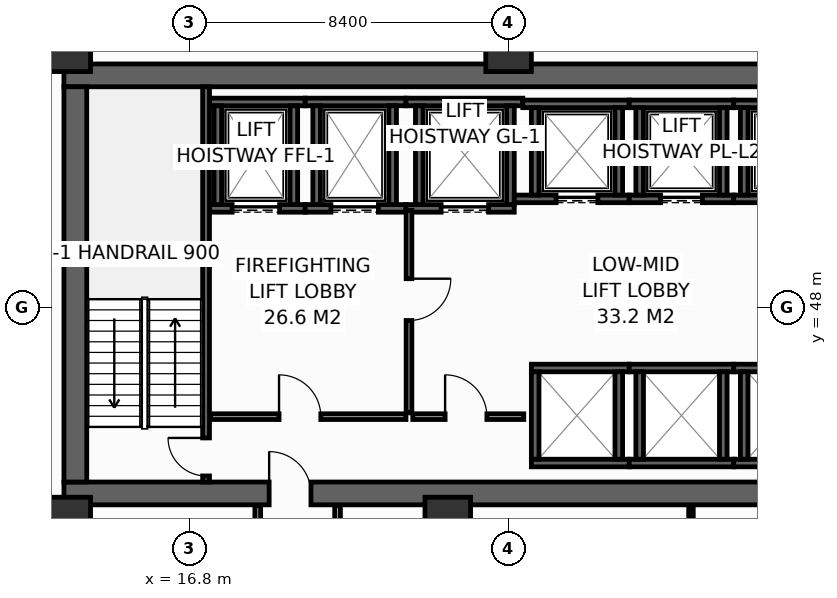
"""IFC4 building model, lengths in metres.
Left out: names, types, materials, properties, quantities, classifications, styles, units other than length and angle.
Written with IfcOpenShell. Run it as: python <this file> out.ifc"""

import sys

from ifc_helpers import new_model, si_unit, direction, frame, frame_2d, origin, origin_2d, place, context, subcontext, project, spatial, rectangle, hollow_rectangle, extrude, element, fill, save


model = new_model("IFC4")
c1 = context("Model", 3, precision=1e-05, world=origin(), true_north=direction((0.0, 1.0)))
c2 = subcontext(c1, "Body", "Model", "MODEL_VIEW")
j1 = project(units=[si_unit("LENGTHUNIT", "METRE"), si_unit("PLANEANGLEUNIT", "RADIAN")], contexts=[c1])
p1 = place(None, origin())
s1 = spatial("IfcSite", under=j1, at=p1, CompositionType="ELEMENT")
p2 = place(p1, origin())
s2 = spatial("IfcBuilding", under=s1, at=p2, CompositionType="ELEMENT")
p3 = place(p2, frame((0.0, 0.0, 51.6)))
s3 = spatial("IfcBuildingStorey", under=s2, at=p3, CompositionType="ELEMENT", Elevation=51.6)
p4 = place(p3, frame((13.5, 43.1, 0.0), z_axis=(0.0, 0.0, 1.0), x_axis=(1.0, 0.0, 0.0)))
e1 = element("IfcWall", 1, at=p4, inside=s3, PredefinedType="SHEAR", context=c2, shape_type="SweptSolid", body=[
    extrude(rectangle(XDim=32.9, YDim=0.6, at=frame_2d((16.45, 0.0))), origin(), (0.0, 0.0, 1.0), 4.15),
])
p5 = place(p4, frame((5.4, 0.0, 0.0)))
e2 = element("IfcOpeningElement", 2, at=p5, cuts=e1, PredefinedType="OPENING", context=c2, shape_type="SweptSolid", body=[
    extrude(rectangle(XDim=1.1, YDim=2.15, at=frame_2d((0.55, 1.075))), frame((0.0, 0.31, 0.0), z_axis=(0.0, -1.0, 0.0), x_axis=(1.0, 0.0, 0.0)), (0.0, 0.0, 1.0), 0.62),
])
p6 = place(p4, frame((25.6, 0.0, 0.0)))
e3 = element("IfcOpeningElement", 3, at=p6, cuts=e1, PredefinedType="OPENING", context=c2, shape_type="SweptSolid", body=[
    extrude(rectangle(XDim=1.1, YDim=2.15, at=frame_2d((0.55, 1.075))), frame((0.0, 0.31, 0.0), z_axis=(0.0, -1.0, 0.0), x_axis=(1.0, 0.0, 0.0)), (0.0, 0.0, 1.0), 0.62),
])
p7 = place(p3, frame((13.5, 54.1, 0.0), z_axis=(0.0, 0.0, 1.0), x_axis=(1.0, 0.0, 0.0)))
e4 = element("IfcWall", 4, at=p7, inside=s3, PredefinedType="SHEAR", context=c2, shape_type="SweptSolid", body=[
    extrude(rectangle(XDim=32.9, YDim=0.6, at=frame_2d((16.45, 0.0))), origin(), (0.0, 0.0, 1.0), 4.15),
])
p8 = place(p3, frame((13.8, 43.4, 0.0), z_axis=(0.0, 0.0, 1.0), x_axis=(0.0, 1.0, 0.0)))
e5 = element("IfcWall", 5, at=p8, inside=s3, PredefinedType="SHEAR", context=c2, shape_type="SweptSolid", body=[
    extrude(rectangle(XDim=10.4, YDim=0.6, at=frame_2d((5.2, 0.0))), origin(), (0.0, 0.0, 1.0), 4.15),
])
for number, where, z_axis, x_axis in (
    (6, (13.6, 54.8, 0.0), (0.0, 0.0, 1.0), (1.0, 0.0, 0.0)),
    (7, (25.2, 54.8, 0.0), (0.0, 0.0, 1.0), (1.0, 0.0, 0.0)),
    (8, (13.6, 42.4, 0.0), (0.0, 0.0, 1.0), (1.0, 0.0, 0.0)),
    (9, (23.6, 42.4, 0.0), (0.0, 0.0, 1.0), (1.0, 0.0, 0.0)),
):
    element("IfcColumn", number, at=place(p3, frame(where, z_axis=z_axis, x_axis=x_axis)), inside=s3, PredefinedType="COLUMN", context=c2, shape_type="SweptSolid", body=[
        extrude(hollow_rectangle(XDim=1.2, YDim=1.2, WallThickness=0.055, at=origin_2d()), origin(), (0.0, 0.0, 1.0), 4.4),
    ])
p9 = place(p3, frame((17.33, 50.6, 0.0), z_axis=(0.0, 0.0, 1.0), x_axis=(1.0, 0.0, 0.0)))
e10 = element("IfcWall", 10, at=p9, inside=s3, PredefinedType="SHEAR", context=c2, shape_type="SweptSolid", body=[
    extrude(rectangle(XDim=2.52, YDim=0.2, at=frame_2d((1.26, 0.0))), origin(), (0.0, 0.0, 1.0), 4.15),
])
p10 = place(p9, frame((0.595, 0.0, 0.0)))
e11 = element("IfcOpeningElement", 11, at=p10, cuts=e10, PredefinedType="OPENING", context=c2, shape_type="SweptSolid", body=[
    extrude(rectangle(XDim=1.25, YDim=2.3, at=frame_2d((0.625, 1.15))), frame((0.0, 0.11, 0.0), z_axis=(0.0, -1.0, 0.0), x_axis=(1.0, 0.0, 0.0)), (0.0, 0.0, 1.0), 0.22),
])
p11 = place(p3, frame((17.33, 53.4, 0.0), z_axis=(0.0, 0.0, 1.0), x_axis=(1.0, 0.0, 0.0)))
e12 = element("IfcWall", 12, at=p11, inside=s3, PredefinedType="SHEAR", context=c2, shape_type="SweptSolid", body=[
    extrude(rectangle(XDim=2.52, YDim=0.2, at=frame_2d((1.26, 0.0))), origin(), (0.0, 0.0, 1.0), 4.15),
])
for number, where, z_axis, x_axis in (
    (13, (17.55, 50.7, 0.0), (0.0, 0.0, 1.0), (0.0, 1.0, 0.0)),
    (14, (19.55, 50.7, 0.0), (0.0, 0.0, 1.0), (0.0, 1.0, 0.0)),
):
    element("IfcWall", number, at=place(p3, frame(where, z_axis=z_axis, x_axis=x_axis)), inside=s3, PredefinedType="SHEAR", context=c2, shape_type="SweptSolid", body=[
        extrude(rectangle(XDim=2.6, YDim=0.2, at=frame_2d((1.3, 0.0))), origin(), (0.0, 0.0, 1.0), 4.15),
    ])
p12 = place(p3, frame((19.85, 50.6, 0.0), z_axis=(0.0, 0.0, 1.0), x_axis=(1.0, 0.0, 0.0)))
e15 = element("IfcWall", 15, at=p12, inside=s3, PredefinedType="SHEAR", context=c2, shape_type="SweptSolid", body=[
    extrude(rectangle(XDim=2.65, YDim=0.2, at=frame_2d((1.325, 0.0))), origin(), (0.0, 0.0, 1.0), 4.15),
])
p13 = place(p12, frame((0.675, 0.0, 0.0)))
e16 = element("IfcOpeningElement", 16, at=p13, cuts=e15, PredefinedType="OPENING", context=c2, shape_type="SweptSolid", body=[
    extrude(rectangle(XDim=1.25, YDim=2.3, at=frame_2d((0.625, 1.15))), frame((0.0, 0.11, 0.0), z_axis=(0.0, -1.0, 0.0), x_axis=(1.0, 0.0, 0.0)), (0.0, 0.0, 1.0), 0.22),
])
p14 = place(p3, frame((19.85, 53.4, 0.0), z_axis=(0.0, 0.0, 1.0), x_axis=(1.0, 0.0, 0.0)))
e17 = element("IfcWall", 17, at=p14, inside=s3, PredefinedType="SHEAR", context=c2, shape_type="SweptSolid", body=[
    extrude(rectangle(XDim=2.65, YDim=0.2, at=frame_2d((1.325, 0.0))), origin(), (0.0, 0.0, 1.0), 4.15),
])
for number, where, z_axis, x_axis in (
    (18, (20.15, 50.7, 0.0), (0.0, 0.0, 1.0), (0.0, 1.0, 0.0)),
    (19, (22.15, 50.7, 0.0), (0.0, 0.0, 1.0), (0.0, 1.0, 0.0)),
):
    element("IfcWall", number, at=place(p3, frame(where, z_axis=z_axis, x_axis=x_axis)), inside=s3, PredefinedType="SHEAR", context=c2, shape_type="SweptSolid", body=[
        extrude(rectangle(XDim=2.6, YDim=0.2, at=frame_2d((1.3, 0.0))), origin(), (0.0, 0.0, 1.0), 4.15),
    ])
p15 = place(p3, frame((22.5, 50.6, 0.0), z_axis=(0.0, 0.0, 1.0), x_axis=(1.0, 0.0, 0.0)))
e20 = element("IfcWall", 20, at=p15, inside=s3, PredefinedType="SHEAR", context=c2, shape_type="SweptSolid", body=[
    extrude(rectangle(XDim=2.85, YDim=0.2, at=frame_2d((1.425, 0.0))), origin(), (0.0, 0.0, 1.0), 4.15),
])
p16 = place(p15, frame((0.925, 0.0, 0.0)))
e21 = element("IfcOpeningElement", 21, at=p16, cuts=e20, PredefinedType="OPENING", context=c2, shape_type="SweptSolid", body=[
    extrude(rectangle(XDim=1.25, YDim=2.3, at=frame_2d((0.625, 1.15))), frame((0.0, 0.11, 0.0), z_axis=(0.0, -1.0, 0.0), x_axis=(1.0, 0.0, 0.0)), (0.0, 0.0, 1.0), 0.22),
])
p17 = place(p3, frame((22.5, 53.4, 0.0), z_axis=(0.0, 0.0, 1.0), x_axis=(1.0, 0.0, 0.0)))
e22 = element("IfcWall", 22, at=p17, inside=s3, PredefinedType="SHEAR", context=c2, shape_type="SweptSolid", body=[
    extrude(rectangle(XDim=3.075, YDim=0.2, at=frame_2d((1.538, 0.0))), origin(), (0.0, 0.0, 1.0), 4.15),
])
for number, where, z_axis, x_axis in (
    (23, (22.85, 50.7, 0.0), (0.0, 0.0, 1.0), (0.0, 1.0, 0.0)),
    (24, (25.25, 50.7, 0.0), (0.0, 0.0, 1.0), (0.0, 1.0, 0.0)),
):
    element("IfcWall", number, at=place(p3, frame(where, z_axis=z_axis, x_axis=x_axis)), inside=s3, PredefinedType="SHEAR", context=c2, shape_type="SweptSolid", body=[
        extrude(rectangle(XDim=2.6, YDim=0.2, at=frame_2d((1.3, 0.0))), origin(), (0.0, 0.0, 1.0), 4.15),
    ])
p18 = place(p3, frame((25.35, 50.85, 0.0), z_axis=(0.0, 0.0, 1.0), x_axis=(1.0, 0.0, 0.0)))
e25 = element("IfcWall", 25, at=p18, inside=s3, PredefinedType="SHEAR", context=c2, shape_type="SweptSolid", body=[
    extrude(rectangle(XDim=3.025, YDim=0.2, at=frame_2d((1.512, 0.0))), origin(), (0.0, 0.0, 1.0), 4.15),
])
p19 = place(p18, frame((1.1, 0.0, 0.0)))
e26 = element("IfcOpeningElement", 26, at=p19, cuts=e25, PredefinedType="OPENING", context=c2, shape_type="SweptSolid", body=[
    extrude(rectangle(XDim=1.1, YDim=2.2, at=frame_2d((0.55, 1.1))), frame((0.0, 0.11, 0.0), z_axis=(0.0, -1.0, 0.0), x_axis=(1.0, 0.0, 0.0)), (0.0, 0.0, 1.0), 0.22),
])
p20 = place(p3, frame((25.575, 53.35, 0.0), z_axis=(0.0, 0.0, 1.0), x_axis=(1.0, 0.0, 0.0)))
e27 = element("IfcWall", 27, at=p20, inside=s3, PredefinedType="SHEAR", context=c2, shape_type="SweptSolid", body=[
    extrude(rectangle(XDim=2.8, YDim=0.2, at=frame_2d((1.4, 0.0))), origin(), (0.0, 0.0, 1.0), 4.15),
])
for number, where, z_axis, x_axis in (
    (28, (25.9, 50.95, 0.0), (0.0, 0.0, 1.0), (0.0, 1.0, 0.0)),
    (29, (28.1, 50.95, 0.0), (0.0, 0.0, 1.0), (0.0, 1.0, 0.0)),
):
    element("IfcWall", number, at=place(p3, frame(where, z_axis=z_axis, x_axis=x_axis)), inside=s3, PredefinedType="SHEAR", context=c2, shape_type="SweptSolid", body=[
        extrude(rectangle(XDim=2.3, YDim=0.2, at=frame_2d((1.15, 0.0))), origin(), (0.0, 0.0, 1.0), 4.15),
    ])
p21 = place(p3, frame((28.375, 50.85, 0.0), z_axis=(0.0, 0.0, 1.0), x_axis=(1.0, 0.0, 0.0)))
e30 = element("IfcWall", 30, at=p21, inside=s3, PredefinedType="SHEAR", context=c2, shape_type="SweptSolid", body=[
    extrude(rectangle(XDim=2.75, YDim=0.2, at=frame_2d((1.375, 0.0))), origin(), (0.0, 0.0, 1.0), 4.15),
])
p22 = place(p21, frame((0.825, 0.0, 0.0)))
e31 = element("IfcOpeningElement", 31, at=p22, cuts=e30, PredefinedType="OPENING", context=c2, shape_type="SweptSolid", body=[
    extrude(rectangle(XDim=1.1, YDim=2.2, at=frame_2d((0.55, 1.1))), frame((0.0, 0.11, 0.0), z_axis=(0.0, -1.0, 0.0), x_axis=(1.0, 0.0, 0.0)), (0.0, 0.0, 1.0), 0.22),
])
p23 = place(p3, frame((28.375, 53.35, 0.0), z_axis=(0.0, 0.0, 1.0), x_axis=(1.0, 0.0, 0.0)))
e32 = element("IfcWall", 32, at=p23, inside=s3, PredefinedType="SHEAR", context=c2, shape_type="SweptSolid", body=[
    extrude(rectangle(XDim=2.75, YDim=0.2, at=frame_2d((1.375, 0.0))), origin(), (0.0, 0.0, 1.0), 4.15),
])
for number, where, z_axis, x_axis in (
    (33, (28.65, 50.95, 0.0), (0.0, 0.0, 1.0), (0.0, 1.0, 0.0)),
    (34, (30.85, 50.95, 0.0), (0.0, 0.0, 1.0), (0.0, 1.0, 0.0)),
):
    element("IfcWall", number, at=place(p3, frame(where, z_axis=z_axis, x_axis=x_axis)), inside=s3, PredefinedType="SHEAR", context=c2, shape_type="SweptSolid", body=[
        extrude(rectangle(XDim=2.3, YDim=0.2, at=frame_2d((1.15, 0.0))), origin(), (0.0, 0.0, 1.0), 4.15),
    ])
p24 = place(p3, frame((31.125, 50.85, 0.0), z_axis=(0.0, 0.0, 1.0), x_axis=(1.0, 0.0, 0.0)))
e35 = element("IfcWall", 35, at=p24, inside=s3, PredefinedType="SHEAR", context=c2, shape_type="SweptSolid", body=[
    extrude(rectangle(XDim=2.825, YDim=0.2, at=frame_2d((1.413, 0.0))), origin(), (0.0, 0.0, 1.0), 4.15),
])
p25 = place(p24, frame((0.825, 0.0, 0.0)))
e36 = element("IfcOpeningElement", 36, at=p25, cuts=e35, PredefinedType="OPENING", context=c2, shape_type="SweptSolid", body=[
    extrude(rectangle(XDim=1.1, YDim=2.2, at=frame_2d((0.55, 1.1))), frame((0.0, 0.11, 0.0), z_axis=(0.0, -1.0, 0.0), x_axis=(1.0, 0.0, 0.0)), (0.0, 0.0, 1.0), 0.22),
])
p26 = place(p3, frame((31.125, 53.35, 0.0), z_axis=(0.0, 0.0, 1.0), x_axis=(1.0, 0.0, 0.0)))
e37 = element("IfcWall", 37, at=p26, inside=s3, PredefinedType="SHEAR", context=c2, shape_type="SweptSolid", body=[
    extrude(rectangle(XDim=2.825, YDim=0.2, at=frame_2d((1.413, 0.0))), origin(), (0.0, 0.0, 1.0), 4.15),
])
p27 = place(p3, frame((31.4, 50.95, 0.0), z_axis=(0.0, 0.0, 1.0), x_axis=(0.0, 1.0, 0.0)))
e38 = element("IfcWall", 38, at=p27, inside=s3, PredefinedType="SHEAR", context=c2, shape_type="SweptSolid", body=[
    extrude(rectangle(XDim=2.3, YDim=0.2, at=frame_2d((1.15, 0.0))), origin(), (0.0, 0.0, 1.0), 4.15),
])
for number, where, z_axis, x_axis in (
    (39, (25.8, 43.9, 0.0), (0.0, 0.0, 1.0), (1.0, 0.0, 0.0)),
    (40, (25.8, 46.4, 0.0), (0.0, 0.0, 1.0), (1.0, 0.0, 0.0)),
):
    element("IfcWall", number, at=place(p3, frame(where, z_axis=z_axis, x_axis=x_axis)), inside=s3, PredefinedType="SHEAR", context=c2, shape_type="SweptSolid", body=[
        extrude(rectangle(XDim=2.575, YDim=0.2, at=frame_2d((1.288, 0.0))), origin(), (0.0, 0.0, 1.0), 4.15),
    ])
for number, where, z_axis, x_axis in (
    (41, (25.9, 44.0, 0.0), (0.0, 0.0, 1.0), (0.0, 1.0, 0.0)),
    (42, (28.1, 44.0, 0.0), (0.0, 0.0, 1.0), (0.0, 1.0, 0.0)),
):
    element("IfcWall", number, at=place(p3, frame(where, z_axis=z_axis, x_axis=x_axis)), inside=s3, PredefinedType="SHEAR", context=c2, shape_type="SweptSolid", body=[
        extrude(rectangle(XDim=2.3, YDim=0.2, at=frame_2d((1.15, 0.0))), origin(), (0.0, 0.0, 1.0), 4.15),
    ])
for number, where, z_axis, x_axis in (
    (43, (28.375, 43.9, 0.0), (0.0, 0.0, 1.0), (1.0, 0.0, 0.0)),
    (44, (28.375, 46.4, 0.0), (0.0, 0.0, 1.0), (1.0, 0.0, 0.0)),
):
    element("IfcWall", number, at=place(p3, frame(where, z_axis=z_axis, x_axis=x_axis)), inside=s3, PredefinedType="SHEAR", context=c2, shape_type="SweptSolid", body=[
        extrude(rectangle(XDim=2.75, YDim=0.2, at=frame_2d((1.375, 0.0))), origin(), (0.0, 0.0, 1.0), 4.15),
    ])
for number, where, z_axis, x_axis in (
    (45, (28.65, 44.0, 0.0), (0.0, 0.0, 1.0), (0.0, 1.0, 0.0)),
    (46, (30.85, 44.0, 0.0), (0.0, 0.0, 1.0), (0.0, 1.0, 0.0)),
):
    element("IfcWall", number, at=place(p3, frame(where, z_axis=z_axis, x_axis=x_axis)), inside=s3, PredefinedType="SHEAR", context=c2, shape_type="SweptSolid", body=[
        extrude(rectangle(XDim=2.3, YDim=0.2, at=frame_2d((1.15, 0.0))), origin(), (0.0, 0.0, 1.0), 4.15),
    ])
for number, where, z_axis, x_axis in (
    (47, (31.125, 43.9, 0.0), (0.0, 0.0, 1.0), (1.0, 0.0, 0.0)),
    (48, (31.125, 46.4, 0.0), (0.0, 0.0, 1.0), (1.0, 0.0, 0.0)),
):
    element("IfcWall", number, at=place(p3, frame(where, z_axis=z_axis, x_axis=x_axis)), inside=s3, PredefinedType="SHEAR", context=c2, shape_type="SweptSolid", body=[
        extrude(rectangle(XDim=2.575, YDim=0.2, at=frame_2d((1.288, 0.0))), origin(), (0.0, 0.0, 1.0), 4.15),
    ])
p28 = place(p3, frame((31.4, 44.0, 0.0), z_axis=(0.0, 0.0, 1.0), x_axis=(0.0, 1.0, 0.0)))
e49 = element("IfcWall", 49, at=p28, inside=s3, PredefinedType="SHEAR", context=c2, shape_type="SweptSolid", body=[
    extrude(rectangle(XDim=2.3, YDim=0.2, at=frame_2d((1.15, 0.0))), origin(), (0.0, 0.0, 1.0), 4.15),
])
p29 = place(p3, frame((17.24, 43.4, 0.0), z_axis=(0.0, 0.0, 1.0), x_axis=(0.0, 1.0, 0.0)))
e50 = element("IfcWall", 50, at=p29, inside=s3, PredefinedType="SHEAR", context=c2, shape_type="SweptSolid", body=[
    extrude(rectangle(XDim=10.4, YDim=0.18, at=frame_2d((5.2, 0.0))), origin(), (0.0, 0.0, 1.0), 4.15),
])
p30 = place(p29, frame((0.16, 0.0, 0.0)))
e51 = element("IfcOpeningElement", 51, at=p30, cuts=e50, PredefinedType="OPENING", context=c2, shape_type="SweptSolid", body=[
    extrude(rectangle(XDim=1.0, YDim=2.15, at=frame_2d((0.5, 1.075))), frame((0.0, 0.1, 0.0), z_axis=(0.0, -1.0, 0.0), x_axis=(1.0, 0.0, 0.0)), (0.0, 0.0, 1.0), 0.2),
])
p31 = place(p3, frame((17.36, 45.12, 0.0), z_axis=(0.0, 0.0, 1.0), x_axis=(1.0, 0.0, 0.0)))
e52 = element("IfcWall", 52, at=p31, inside=s3, PredefinedType="PARTITIONING", context=c2, shape_type="SweptSolid", body=[
    extrude(rectangle(XDim=5.14, YDim=0.15, at=frame_2d((2.57, 0.0))), origin(), (0.0, 0.0, 1.0), 4.15),
])
p32 = place(p31, frame((1.8, 0.0, 0.0)))
e53 = element("IfcOpeningElement", 53, at=p32, cuts=e52, PredefinedType="OPENING", context=c2, shape_type="SweptSolid", body=[
    extrude(rectangle(XDim=1.1, YDim=2.15, at=frame_2d((0.55, 1.075))), frame((0.0, 0.085, 0.0), z_axis=(0.0, -1.0, 0.0), x_axis=(1.0, 0.0, 0.0)), (0.0, 0.0, 1.0), 0.17),
])
p33 = place(p3, frame((22.58, 50.55, 0.0), z_axis=(0.0, 0.0, 1.0), x_axis=(0.0, -1.0, 0.0)))
e54 = element("IfcWall", 54, at=p33, inside=s3, PredefinedType="PARTITIONING", context=c2, shape_type="SweptSolid", body=[
    extrude(rectangle(XDim=5.33, YDim=0.15, at=frame_2d((2.665, 0.0))), origin(), (0.0, 0.0, 1.0), 4.15),
])
p34 = place(p33, frame((1.8, 0.0, 0.0)))
e55 = element("IfcOpeningElement", 55, at=p34, cuts=e54, PredefinedType="OPENING", context=c2, shape_type="SweptSolid", body=[
    extrude(rectangle(XDim=1.1, YDim=2.15, at=frame_2d((0.55, 1.075))), frame((0.0, 0.085, 0.0), z_axis=(0.0, -1.0, 0.0), x_axis=(1.0, 0.0, 0.0)), (0.0, 0.0, 1.0), 0.17),
])
p35 = place(p3, frame((22.68, 45.12, 0.0), z_axis=(0.0, 0.0, 1.0), x_axis=(1.0, 0.0, 0.0)))
e56 = element("IfcWall", 56, at=p35, inside=s3, PredefinedType="PARTITIONING", context=c2, shape_type="SweptSolid", body=[
    extrude(rectangle(XDim=2.92, YDim=0.15, at=frame_2d((1.46, 0.0))), origin(), (0.0, 0.0, 1.0), 4.15),
])
p36 = place(p35, frame((0.85, 0.0, 0.0)))
e57 = element("IfcOpeningElement", 57, at=p36, cuts=e56, PredefinedType="OPENING", context=c2, shape_type="SweptSolid", body=[
    extrude(rectangle(XDim=1.1, YDim=2.15, at=frame_2d((0.55, 1.075))), frame((0.0, 0.085, 0.0), z_axis=(0.0, -1.0, 0.0), x_axis=(1.0, 0.0, 0.0)), (0.0, 0.0, 1.0), 0.17),
])
p37 = place(p3, frame((13.8, 41.03, 0.0), z_axis=(0.0, 0.0, 1.0), x_axis=(0.0, 1.0, 0.0)))
e58 = element("IfcWall", 58, at=p37, inside=s3, PredefinedType="PARTITIONING", context=c2, shape_type="SweptSolid", body=[
    extrude(rectangle(XDim=1.75, YDim=0.12, at=frame_2d((0.875, 0.0))), origin(), (0.0, 0.0, 1.0), 4.15),
])
for number, where, z_axis, x_axis in (
    (59, (18.6, 40.95, 0.0), (0.0, 0.0, 1.0), (0.0, 1.0, 0.0)),
    (60, (20.7, 40.95, 0.0), (0.0, 0.0, 1.0), (0.0, 1.0, 0.0)),
):
    element("IfcWall", number, at=place(p3, frame(where, z_axis=z_axis, x_axis=x_axis)), inside=s3, PredefinedType="PARTITIONING", context=c2, shape_type="SweptSolid", body=[
        extrude(rectangle(XDim=1.83, YDim=0.15, at=frame_2d((0.915, 0.0))), origin(), (0.0, 0.0, 1.0), 4.15),
    ])
p38 = place(p3, frame((30.0, 40.95, 0.0), z_axis=(0.0, 0.0, 1.0), x_axis=(0.0, 1.0, 0.0)))
e61 = element("IfcWall", 61, at=p38, inside=s3, PredefinedType="PARTITIONING", context=c2, shape_type="SweptSolid", body=[
    extrude(rectangle(XDim=1.83, YDim=0.12, at=frame_2d((0.915, 0.0))), origin(), (0.0, 0.0, 1.0), 3.335),
])
p39 = place(p10, origin())
e62 = element("IfcDoor", 62, at=p39, inside=s3, OperationType="SLIDING_TO_LEFT", PredefinedType="DOOR", context=c2, shape_type="SweptSolid", body=[
    extrude(rectangle(XDim=1.25, YDim=2.3, at=frame_2d((0.625, 1.15))), frame((0.0, 0.025, 0.0), z_axis=(0.0, -1.0, 0.0), x_axis=(1.0, 0.0, 0.0)), (0.0, 0.0, 1.0), 0.05),
])
fill(e11, e62)
p40 = place(p13, origin())
e63 = element("IfcDoor", 63, at=p40, inside=s3, OperationType="SLIDING_TO_LEFT", PredefinedType="DOOR", context=c2, shape_type="SweptSolid", body=[
    extrude(rectangle(XDim=1.25, YDim=2.3, at=frame_2d((0.625, 1.15))), frame((0.0, 0.025, 0.0), z_axis=(0.0, -1.0, 0.0), x_axis=(1.0, 0.0, 0.0)), (0.0, 0.0, 1.0), 0.05),
])
fill(e16, e63)
p41 = place(p16, origin())
e64 = element("IfcDoor", 64, at=p41, inside=s3, OperationType="SLIDING_TO_LEFT", PredefinedType="DOOR", context=c2, shape_type="SweptSolid", body=[
    extrude(rectangle(XDim=1.25, YDim=2.3, at=frame_2d((0.625, 1.15))), frame((0.0, 0.025, 0.0), z_axis=(0.0, -1.0, 0.0), x_axis=(1.0, 0.0, 0.0)), (0.0, 0.0, 1.0), 0.05),
])
fill(e21, e64)
p42 = place(p19, origin())
e65 = element("IfcDoor", 65, at=p42, inside=s3, OperationType="SLIDING_TO_LEFT", PredefinedType="DOOR", context=c2, shape_type="SweptSolid", body=[
    extrude(rectangle(XDim=1.1, YDim=2.2, at=frame_2d((0.55, 1.1))), frame((0.0, 0.025, 0.0), z_axis=(0.0, -1.0, 0.0), x_axis=(1.0, 0.0, 0.0)), (0.0, 0.0, 1.0), 0.05),
])
fill(e26, e65)
p43 = place(p22, origin())
e66 = element("IfcDoor", 66, at=p43, inside=s3, OperationType="SLIDING_TO_LEFT", PredefinedType="DOOR", context=c2, shape_type="SweptSolid", body=[
    extrude(rectangle(XDim=1.1, YDim=2.2, at=frame_2d((0.55, 1.1))), frame((0.0, 0.025, 0.0), z_axis=(0.0, -1.0, 0.0), x_axis=(1.0, 0.0, 0.0)), (0.0, 0.0, 1.0), 0.05),
])
fill(e31, e66)
p44 = place(p30, origin())
e67 = element("IfcDoor", 67, at=p44, inside=s3, OperationType="SINGLE_SWING_RIGHT", PredefinedType="DOOR", context=c2, shape_type="SweptSolid", body=[
    extrude(rectangle(XDim=1.0, YDim=2.15, at=frame_2d((0.5, 1.075))), frame((0.0, 0.025, 0.0), z_axis=(0.0, -1.0, 0.0), x_axis=(1.0, 0.0, 0.0)), (0.0, 0.0, 1.0), 0.05),
])
fill(e51, e67)
p45 = place(p32, origin())
e68 = element("IfcDoor", 68, at=p45, inside=s3, OperationType="SINGLE_SWING_LEFT", PredefinedType="DOOR", context=c2, shape_type="SweptSolid", body=[
    extrude(rectangle(XDim=1.1, YDim=2.15, at=frame_2d((0.55, 1.075))), frame((0.0, 0.025, 0.0), z_axis=(0.0, -1.0, 0.0), x_axis=(1.0, 0.0, 0.0)), (0.0, 0.0, 1.0), 0.05),
])
fill(e53, e68)
p46 = place(p34, origin())
e69 = element("IfcDoor", 69, at=p46, inside=s3, OperationType="SINGLE_SWING_LEFT", PredefinedType="DOOR", context=c2, shape_type="SweptSolid", body=[
    extrude(rectangle(XDim=1.1, YDim=2.15, at=frame_2d((0.55, 1.075))), frame((0.0, 0.025, 0.0), z_axis=(0.0, -1.0, 0.0), x_axis=(1.0, 0.0, 0.0)), (0.0, 0.0, 1.0), 0.05),
])
fill(e55, e69)
p47 = place(p36, origin())
e70 = element("IfcDoor", 70, at=p47, inside=s3, OperationType="SINGLE_SWING_LEFT", PredefinedType="DOOR", context=c2, shape_type="SweptSolid", body=[
    extrude(rectangle(XDim=1.1, YDim=2.15, at=frame_2d((0.55, 1.075))), frame((0.0, 0.025, 0.0), z_axis=(0.0, -1.0, 0.0), x_axis=(1.0, 0.0, 0.0)), (0.0, 0.0, 1.0), 0.05),
])
fill(e57, e70)
p48 = place(p5, origin())
e71 = element("IfcDoor", 71, at=p48, inside=s3, OperationType="SINGLE_SWING_LEFT", PredefinedType="DOOR", context=c2, shape_type="SweptSolid", body=[
    extrude(rectangle(XDim=1.1, YDim=2.15, at=frame_2d((0.55, 1.075))), frame((0.0, 0.025, 0.0), z_axis=(0.0, -1.0, 0.0), x_axis=(1.0, 0.0, 0.0)), (0.0, 0.0, 1.0), 0.05),
])
fill(e2, e71)
save(model, sys.argv[1])
